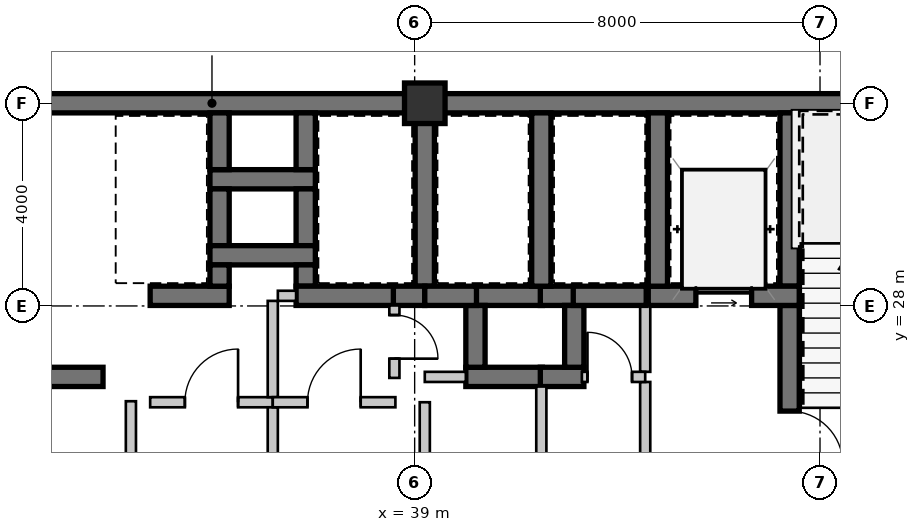
"""IFC4 building model, lengths in metres.
Left out: names, types, materials, properties, quantities, classifications, styles, units other than length and angle.
Written with IfcOpenShell. Run it as: python <this file> out.ifc"""

import sys

from ifc_helpers import new_model, si_unit, direction, frame, frame_2d, origin, origin_2d, place, context, subcontext, project, spatial, rectangle, extrude, source, transform, mapped, element, fill, save


model = new_model("IFC4")
c1 = context("Model", 3, precision=1e-05, world=origin(), true_north=direction((0.0, 1.0)))
c2 = subcontext(c1, "Body", "Model", "MODEL_VIEW")
j1 = project(units=[si_unit("LENGTHUNIT", "METRE"), si_unit("PLANEANGLEUNIT", "RADIAN")], contexts=[c1])
p1 = place(None, origin())
s1 = spatial("IfcSite", under=j1, at=p1, CompositionType="ELEMENT")
p2 = place(p1, origin())
s2 = spatial("IfcBuilding", under=s1, at=p2, CompositionType="ELEMENT")
p3 = place(p2, frame((0.0, 0.0, 45.15)))
s3 = spatial("IfcBuildingStorey", under=s2, at=p3, CompositionType="ELEMENT", Elevation=45.15)
m1 = source(origin(), c2, "Body", "SweptSolid", [
    extrude(rectangle(XDim=0.8, YDim=0.8, at=origin_2d()), origin(), (0.0, 0.0, 1.0), 3.15),
])
p4 = place(p3, frame((39.2, 32.0, 0.0), z_axis=(0.0, 0.0, 1.0), x_axis=(1.0, 0.0, 0.0)))
e1 = element("IfcColumn", 1, at=p4, inside=s3, PredefinedType="COLUMN", context=c2, shape_type="MappedRepresentation", body=[
    mapped(m1, transform((0.0, 0.0, 0.0), scale=1.0)),
])
m2 = source(origin(), c2, "Body", "SweptSolid", [
    extrude(rectangle(XDim=11.2, YDim=0.38, at=frame_2d((5.6, 0.0))), origin(), (0.0, 0.0, 1.0), 2.93),
])
p5 = place(p3, frame((28.0, 32.0, 0.0), z_axis=(0.0, 0.0, 1.0), x_axis=(1.0, 0.0, 0.0)))
e2 = element("IfcWall", 2, at=p5, inside=s3, PredefinedType="SHEAR", context=c2, shape_type="MappedRepresentation", body=[
    mapped(m2, transform((0.0, 0.0, 0.0), scale=1.0)),
])
m3 = source(origin(), c2, "Body", "SweptSolid", [
    extrude(rectangle(XDim=11.99, YDim=0.38, at=frame_2d((5.995, 0.0))), origin(), (0.0, 0.0, 1.0), 2.93),
])
p6 = place(p3, frame((39.2, 32.0, 0.0), z_axis=(0.0, 0.0, 1.0), x_axis=(1.0, 0.0, 0.0)))
e3 = element("IfcWall", 3, at=p6, inside=s3, PredefinedType="SHEAR", context=c2, shape_type="MappedRepresentation", body=[
    mapped(m3, transform((0.0, 0.0, 0.0), scale=1.0)),
])
m4 = source(origin(), c2, "Body", "SweptSolid", [
    extrude(rectangle(XDim=3.42, YDim=0.38, at=frame_2d((1.71, 0.0))), origin(), (0.0, 0.0, 1.0), 2.93),
])
p7 = place(p3, frame((46.4, 31.81, 0.0), z_axis=(0.0, 0.0, 1.0), x_axis=(0.0, -1.0, 0.0)))
e4 = element("IfcWall", 4, at=p7, inside=s3, PredefinedType="SHEAR", context=c2, shape_type="MappedRepresentation", body=[
    mapped(m4, transform((0.0, 0.0, 0.0), scale=1.0)),
])
m5 = source(origin(), c2, "Body", "SweptSolid", [
    extrude(rectangle(XDim=3.82, YDim=0.38, at=frame_2d((1.91, 0.0))), origin(), (0.0, 0.0, 1.0), 2.93),
])
p8 = place(p3, frame((46.4, 28.01, 0.0), z_axis=(0.0, 0.0, 1.0), x_axis=(0.0, -1.0, 0.0)))
e5 = element("IfcWall", 5, at=p8, inside=s3, PredefinedType="SHEAR", context=c2, shape_type="MappedRepresentation", body=[
    mapped(m5, transform((0.0, 0.0, 0.0), scale=1.0)),
])
m6 = source(origin(), c2, "Body", "SweptSolid", [
    extrude(rectangle(XDim=1.05, YDim=2.1, at=frame_2d((0.525, 1.05))), frame((0.0, 0.2, 0.0), z_axis=(0.0, -1.0, 0.0), x_axis=(1.0, 0.0, 0.0)), (0.0, 0.0, 1.0), 0.4),
])
p9 = place(p8, frame((2.085, 0.0, 0.0)))
e6 = element("IfcOpeningElement", 6, at=p9, cuts=e5, PredefinedType="OPENING", context=c2, shape_type="MappedRepresentation", body=[
    mapped(m6, transform((0.0, 0.0, 0.0), scale=1.0)),
])
m7 = source(origin(), c2, "Body", "SweptSolid", [
    extrude(rectangle(XDim=2.98, YDim=0.38, at=frame_2d((1.49, 0.0))), origin(), (0.0, 0.0, 1.0), 2.93),
])
p10 = place(p3, frame((43.61, 28.2, 0.0), z_axis=(0.0, 0.0, 1.0), x_axis=(1.0, 0.0, 0.0)))
e7 = element("IfcWall", 7, at=p10, inside=s3, PredefinedType="SHEAR", context=c2, shape_type="MappedRepresentation", body=[
    mapped(m7, transform((0.0, 0.0, 0.0), scale=1.0)),
])
m8 = source(origin(), c2, "Body", "SweptSolid", [
    extrude(rectangle(XDim=1.1, YDim=2.15, at=frame_2d((0.55, 1.075))), frame((0.0, 0.2, 0.0), z_axis=(0.0, -1.0, 0.0), x_axis=(1.0, 0.0, 0.0)), (0.0, 0.0, 1.0), 0.4),
])
p11 = place(p10, frame((0.94, 0.0, 0.0)))
e8 = element("IfcOpeningElement", 8, at=p11, cuts=e7, PredefinedType="OPENING", context=c2, shape_type="MappedRepresentation", body=[
    mapped(m8, transform((0.0, 0.0, 0.0), scale=1.0)),
])
p12 = place(p3, frame((43.8, 31.81, 0.0), z_axis=(0.0, 0.0, 1.0), x_axis=(0.0, -1.0, 0.0)))
e9 = element("IfcWall", 9, at=p12, inside=s3, PredefinedType="SHEAR", context=c2, shape_type="MappedRepresentation", body=[
    mapped(m4, transform((0.0, 0.0, 0.0), scale=1.0)),
])
m9 = source(origin(), c2, "Body", "SweptSolid", [
    extrude(rectangle(XDim=2.4, YDim=0.2, at=frame_2d((1.2, 0.0))), origin(), (0.0, 0.0, 1.0), 2.93),
])
p13 = place(p3, frame((43.55, 26.5, 0.0), z_axis=(0.0, 0.0, 1.0), x_axis=(0.0, -1.0, 0.0)))
e10 = element("IfcWall", 10, at=p13, inside=s3, PredefinedType="SOLIDWALL", context=c2, shape_type="MappedRepresentation", body=[
    mapped(m9, transform((0.0, 0.0, 0.0), scale=1.0)),
])
m10 = source(origin(), c2, "Body", "SweptSolid", [
    extrude(rectangle(XDim=1.31, YDim=0.2, at=frame_2d((0.655, 0.0))), origin(), (0.0, 0.0, 1.0), 2.93),
])
p14 = place(p3, frame((43.55, 28.01, 0.0), z_axis=(0.0, 0.0, 1.0), x_axis=(0.0, -1.0, 0.0)))
e11 = element("IfcWall", 11, at=p14, inside=s3, PredefinedType="SOLIDWALL", context=c2, shape_type="MappedRepresentation", body=[
    mapped(m10, transform((0.0, 0.0, 0.0), scale=1.0)),
])
m11 = source(origin(), c2, "Body", "SweptSolid", [
    extrude(rectangle(XDim=2.08, YDim=0.38, at=frame_2d((1.04, 0.0))), origin(), (0.0, 0.0, 1.0), 2.93),
])
p15 = place(p3, frame((34.96, 30.5, 0.0), z_axis=(0.0, 0.0, 1.0), x_axis=(1.0, 0.0, 0.0)))
e12 = element("IfcWall", 12, at=p15, inside=s3, PredefinedType="SHEAR", context=c2, shape_type="MappedRepresentation", body=[
    mapped(m11, transform((0.0, 0.0, 0.0), scale=1.0)),
])
m12 = source(origin(), c2, "Body", "SweptSolid", [
    extrude(rectangle(XDim=1.12, YDim=0.38, at=frame_2d((0.56, 0.0))), origin(), (0.0, 0.0, 1.0), 2.93),
])
for number, where, z_axis, x_axis in (
    (13, (35.15, 31.81, 0.0), (0.0, 0.0, 1.0), (0.0, -1.0, 0.0)),
    (14, (36.85, 30.69, 0.0), (0.0, 0.0, 1.0), (0.0, 1.0, 0.0)),
    (15, (35.15, 30.31, 0.0), (0.0, 0.0, 1.0), (0.0, -1.0, 0.0)),
    (16, (36.85, 29.19, 0.0), (0.0, 0.0, 1.0), (0.0, 1.0, 0.0)),
):
    element("IfcWall", number, at=place(p3, frame(where, z_axis=z_axis, x_axis=x_axis)), inside=s3, PredefinedType="SHEAR", context=c2, shape_type="MappedRepresentation", body=[
        mapped(m12, transform((0.0, 0.0, 0.0), scale=1.0)),
    ])
p16 = place(p3, frame((34.96, 29.0, 0.0), z_axis=(0.0, 0.0, 1.0), x_axis=(1.0, 0.0, 0.0)))
e17 = element("IfcWall", 17, at=p16, inside=s3, PredefinedType="SHEAR", context=c2, shape_type="MappedRepresentation", body=[
    mapped(m11, transform((0.0, 0.0, 0.0), scale=1.0)),
])
m13 = source(origin(), c2, "Body", "SweptSolid", [
    extrude(rectangle(XDim=2.24, YDim=0.38, at=frame_2d((1.12, 0.0))), origin(), (0.0, 0.0, 1.0), 2.93),
])
p17 = place(p3, frame((30.61, 26.6, 0.0), z_axis=(0.0, 0.0, 1.0), x_axis=(1.0, 0.0, 0.0)))
e18 = element("IfcWall", 18, at=p17, inside=s3, PredefinedType="SHEAR", context=c2, shape_type="MappedRepresentation", body=[
    mapped(m13, transform((0.0, 0.0, 0.0), scale=1.0)),
])
m14 = source(origin(), c2, "Body", "SweptSolid", [
    extrude(rectangle(XDim=1.32, YDim=0.38, at=frame_2d((0.66, 0.0))), origin(), (0.0, 0.0, 1.0), 2.93),
])
p18 = place(p3, frame((41.52, 28.2, 0.0), z_axis=(0.0, 0.0, 1.0), x_axis=(-1.0, 0.0, 0.0)))
e19 = element("IfcWall", 19, at=p18, inside=s3, PredefinedType="SHEAR", context=c2, shape_type="MappedRepresentation", body=[
    mapped(m14, transform((0.0, 0.0, 0.0), scale=1.0)),
])
m15 = source(origin(), c2, "Body", "SweptSolid", [
    extrude(rectangle(XDim=0.67, YDim=0.38, at=frame_2d((0.335, 0.0))), origin(), (0.0, 0.0, 1.0), 2.93),
])
p19 = place(p3, frame((42.15, 28.2, 0.0), z_axis=(0.0, 0.0, 1.0), x_axis=(-1.0, 0.0, 0.0)))
e20 = element("IfcWall", 20, at=p19, inside=s3, PredefinedType="SHEAR", context=c2, shape_type="MappedRepresentation", body=[
    mapped(m15, transform((0.0, 0.0, 0.0), scale=1.0)),
])
m16 = source(origin(), c2, "Body", "SweptSolid", [
    extrude(rectangle(XDim=1.51, YDim=0.38, at=frame_2d((0.755, 0.0))), origin(), (0.0, 0.0, 1.0), 2.93),
])
p20 = place(p3, frame((40.01, 26.6, 0.0), z_axis=(0.0, 0.0, 1.0), x_axis=(1.0, 0.0, 0.0)))
e21 = element("IfcWall", 21, at=p20, inside=s3, PredefinedType="SHEAR", context=c2, shape_type="MappedRepresentation", body=[
    mapped(m16, transform((0.0, 0.0, 0.0), scale=1.0)),
])
m17 = source(origin(), c2, "Body", "SweptSolid", [
    extrude(rectangle(XDim=1.22, YDim=0.38, at=frame_2d((0.61, 0.0))), origin(), (0.0, 0.0, 1.0), 2.93),
])
p21 = place(p3, frame((40.2, 28.01, 0.0), z_axis=(0.0, 0.0, 1.0), x_axis=(0.0, -1.0, 0.0)))
e22 = element("IfcWall", 22, at=p21, inside=s3, PredefinedType="SHEAR", context=c2, shape_type="MappedRepresentation", body=[
    mapped(m17, transform((0.0, 0.0, 0.0), scale=1.0)),
])
m18 = source(origin(), c2, "Body", "SweptSolid", [
    extrude(rectangle(XDim=0.86, YDim=0.38, at=frame_2d((0.43, 0.0))), origin(), (0.0, 0.0, 1.0), 2.93),
])
p22 = place(p3, frame((41.48, 26.6, 0.0), z_axis=(0.0, 0.0, 1.0), x_axis=(1.0, 0.0, 0.0)))
e23 = element("IfcWall", 23, at=p22, inside=s3, PredefinedType="SHEAR", context=c2, shape_type="MappedRepresentation", body=[
    mapped(m18, transform((0.0, 0.0, 0.0), scale=1.0)),
])
p23 = place(p3, frame((42.15, 26.79, 0.0), z_axis=(0.0, 0.0, 1.0), x_axis=(0.0, 1.0, 0.0)))
e24 = element("IfcWall", 24, at=p23, inside=s3, PredefinedType="SHEAR", context=c2, shape_type="MappedRepresentation", body=[
    mapped(m17, transform((0.0, 0.0, 0.0), scale=1.0)),
])
m19 = source(origin(), c2, "Body", "SweptSolid", [
    extrude(rectangle(XDim=1.56, YDim=0.38, at=frame_2d((0.78, 0.0))), origin(), (0.0, 0.0, 1.0), 2.93),
])
p24 = place(p3, frame((33.78, 28.2, 0.0), z_axis=(0.0, 0.0, 1.0), x_axis=(1.0, 0.0, 0.0)))
e25 = element("IfcWall", 25, at=p24, inside=s3, PredefinedType="SHEAR", context=c2, shape_type="MappedRepresentation", body=[
    mapped(m19, transform((0.0, 0.0, 0.0), scale=1.0)),
])
m20 = source(origin(), c2, "Body", "SweptSolid", [
    extrude(rectangle(XDim=0.42, YDim=0.38, at=frame_2d((0.21, 0.0))), origin(), (0.0, 0.0, 1.0), 2.93),
])
p25 = place(p3, frame((35.15, 28.39, 0.0), z_axis=(0.0, 0.0, 1.0), x_axis=(0.0, 1.0, 0.0)))
e26 = element("IfcWall", 26, at=p25, inside=s3, PredefinedType="SHEAR", context=c2, shape_type="MappedRepresentation", body=[
    mapped(m20, transform((0.0, 0.0, 0.0), scale=1.0)),
])
p26 = place(p3, frame((39.2, 28.39, 0.0), z_axis=(0.0, 0.0, 1.0), x_axis=(0.0, 1.0, 0.0)))
e27 = element("IfcWall", 27, at=p26, inside=s3, PredefinedType="SHEAR", context=c2, shape_type="MappedRepresentation", body=[
    mapped(m4, transform((0.0, 0.0, 0.0), scale=1.0)),
])
p27 = place(p3, frame((36.85, 28.81, 0.0), z_axis=(0.0, 0.0, 1.0), x_axis=(0.0, -1.0, 0.0)))
e28 = element("IfcWall", 28, at=p27, inside=s3, PredefinedType="SHEAR", context=c2, shape_type="MappedRepresentation", body=[
    mapped(m20, transform((0.0, 0.0, 0.0), scale=1.0)),
])
m21 = source(origin(), c2, "Body", "SweptSolid", [
    extrude(rectangle(XDim=1.96, YDim=0.38, at=frame_2d((0.98, 0.0))), origin(), (0.0, 0.0, 1.0), 2.93),
])
p28 = place(p3, frame((36.66, 28.2, 0.0), z_axis=(0.0, 0.0, 1.0), x_axis=(1.0, 0.0, 0.0)))
e29 = element("IfcWall", 29, at=p28, inside=s3, PredefinedType="SHEAR", context=c2, shape_type="MappedRepresentation", body=[
    mapped(m21, transform((0.0, 0.0, 0.0), scale=1.0)),
])
m22 = source(origin(), c2, "Body", "SweptSolid", [
    extrude(rectangle(XDim=0.62, YDim=0.38, at=frame_2d((0.31, 0.0))), origin(), (0.0, 0.0, 1.0), 2.93),
])
p29 = place(p3, frame((38.58, 28.2, 0.0), z_axis=(0.0, 0.0, 1.0), x_axis=(1.0, 0.0, 0.0)))
e30 = element("IfcWall", 30, at=p29, inside=s3, PredefinedType="SHEAR", context=c2, shape_type="MappedRepresentation", body=[
    mapped(m22, transform((0.0, 0.0, 0.0), scale=1.0)),
])
p30 = place(p3, frame((41.5, 28.39, 0.0), z_axis=(0.0, 0.0, 1.0), x_axis=(0.0, 1.0, 0.0)))
e31 = element("IfcWall", 31, at=p30, inside=s3, PredefinedType="SHEAR", context=c2, shape_type="MappedRepresentation", body=[
    mapped(m4, transform((0.0, 0.0, 0.0), scale=1.0)),
])
m23 = source(origin(), c2, "Body", "SweptSolid", [
    extrude(rectangle(XDim=1.02, YDim=0.38, at=frame_2d((0.51, 0.0))), origin(), (0.0, 0.0, 1.0), 2.93),
])
p31 = place(p3, frame((39.2, 28.2, 0.0), z_axis=(0.0, 0.0, 1.0), x_axis=(1.0, 0.0, 0.0)))
e32 = element("IfcWall", 32, at=p31, inside=s3, PredefinedType="SHEAR", context=c2, shape_type="MappedRepresentation", body=[
    mapped(m23, transform((0.0, 0.0, 0.0), scale=1.0)),
])
m24 = source(origin(), c2, "Body", "SweptSolid", [
    extrude(rectangle(XDim=1.44, YDim=0.38, at=frame_2d((0.72, 0.0))), origin(), (0.0, 0.0, 1.0), 2.93),
])
p32 = place(p3, frame((42.13, 28.2, 0.0), z_axis=(0.0, 0.0, 1.0), x_axis=(1.0, 0.0, 0.0)))
e33 = element("IfcWall", 33, at=p32, inside=s3, PredefinedType="SHEAR", context=c2, shape_type="MappedRepresentation", body=[
    mapped(m24, transform((0.0, 0.0, 0.0), scale=1.0)),
])
m25 = source(origin(), c2, "Body", "SweptSolid", [
    extrude(rectangle(XDim=2.02, YDim=0.2, at=frame_2d((1.01, 0.0))), origin(), (0.0, 0.0, 1.0), 2.93),
])
p33 = place(p3, frame((33.4, 26.12, 0.0), z_axis=(0.0, 0.0, 1.0), x_axis=(0.0, -1.0, 0.0)))
e34 = element("IfcWall", 34, at=p33, inside=s3, PredefinedType="SOLIDWALL", context=c2, shape_type="MappedRepresentation", body=[
    mapped(m25, transform((0.0, 0.0, 0.0), scale=1.0)),
])
m26 = source(origin(), c2, "Body", "SweptSolid", [
    extrude(rectangle(XDim=2.42, YDim=0.2, at=frame_2d((1.21, 0.0))), origin(), (0.0, 0.0, 1.0), 2.93),
])
p34 = place(p3, frame((33.78, 26.1, 0.0), z_axis=(0.0, 0.0, 1.0), x_axis=(1.0, 0.0, 0.0)))
e35 = element("IfcWall", 35, at=p34, inside=s3, PredefinedType="SOLIDWALL", context=c2, shape_type="MappedRepresentation", body=[
    mapped(m26, transform((0.0, 0.0, 0.0), scale=1.0)),
])
m27 = source(origin(), c2, "Body", "SweptSolid", [
    extrude(rectangle(XDim=1.05, YDim=2.1, at=frame_2d((0.525, 1.05))), frame((0.0, 0.11, 0.0), z_axis=(0.0, -1.0, 0.0), x_axis=(1.0, 0.0, 0.0)), (0.0, 0.0, 1.0), 0.22),
])
p35 = place(p34, frame((0.685, 0.0, 0.0)))
e36 = element("IfcOpeningElement", 36, at=p35, cuts=e35, PredefinedType="OPENING", context=c2, shape_type="MappedRepresentation", body=[
    mapped(m27, transform((0.0, 0.0, 0.0), scale=1.0)),
])
m28 = source(origin(), c2, "Body", "SweptSolid", [
    extrude(rectangle(XDim=1.9, YDim=0.2, at=frame_2d((0.95, 0.0))), origin(), (0.0, 0.0, 1.0), 2.93),
])
p36 = place(p3, frame((36.2, 26.0, 0.0), z_axis=(0.0, 0.0, 1.0), x_axis=(0.0, -1.0, 0.0)))
e37 = element("IfcWall", 37, at=p36, inside=s3, PredefinedType="SOLIDWALL", context=c2, shape_type="MappedRepresentation", body=[
    mapped(m28, transform((0.0, 0.0, 0.0), scale=1.0)),
])
m29 = source(origin(), c2, "Body", "SweptSolid", [
    extrude(rectangle(XDim=1.9, YDim=0.2, at=frame_2d((0.95, 0.0))), origin(), (0.0, 0.0, 1.0), 2.93),
])
p37 = place(p3, frame((36.2, 28.1, 0.0), z_axis=(0.0, 0.0, 1.0), x_axis=(0.0, -1.0, 0.0)))
e38 = element("IfcWall", 38, at=p37, inside=s3, PredefinedType="SOLIDWALL", context=c2, shape_type="MappedRepresentation", body=[
    mapped(m29, transform((0.0, 0.0, 0.0), scale=1.0)),
])
m30 = source(origin(), c2, "Body", "SweptSolid", [
    extrude(rectangle(XDim=0.36, YDim=0.2, at=frame_2d((0.18, 0.0))), origin(), (0.0, 0.0, 1.0), 2.93),
])
p38 = place(p3, frame((36.66, 28.2, 0.0), z_axis=(0.0, 0.0, 1.0), x_axis=(-1.0, 0.0, 0.0)))
e39 = element("IfcWall", 39, at=p38, inside=s3, PredefinedType="SOLIDWALL", context=c2, shape_type="MappedRepresentation", body=[
    mapped(m30, transform((0.0, 0.0, 0.0), scale=1.0)),
])
m31 = source(origin(), c2, "Body", "SweptSolid", [
    extrude(rectangle(XDim=2.42, YDim=0.2, at=frame_2d((1.21, 0.0))), origin(), (0.0, 0.0, 1.0), 2.93),
])
p39 = place(p3, frame((36.2, 26.1, 0.0), z_axis=(0.0, 0.0, 1.0), x_axis=(1.0, 0.0, 0.0)))
e40 = element("IfcWall", 40, at=p39, inside=s3, PredefinedType="SOLIDWALL", context=c2, shape_type="MappedRepresentation", body=[
    mapped(m31, transform((0.0, 0.0, 0.0), scale=1.0)),
])
p40 = place(p39, frame((0.685, 0.0, 0.0)))
e41 = element("IfcOpeningElement", 41, at=p40, cuts=e40, PredefinedType="OPENING", context=c2, shape_type="MappedRepresentation", body=[
    mapped(m27, transform((0.0, 0.0, 0.0), scale=1.0)),
])
m32 = source(origin(), c2, "Body", "SweptSolid", [
    extrude(rectangle(XDim=2.0, YDim=0.2, at=frame_2d((1.0, 0.0))), origin(), (0.0, 0.0, 1.0), 2.47),
])
p41 = place(p3, frame((39.2, 26.1, 0.0), z_axis=(0.0, 0.0, 1.0), x_axis=(0.0, -1.0, 0.0)))
e42 = element("IfcWall", 42, at=p41, inside=s3, PredefinedType="SOLIDWALL", context=c2, shape_type="MappedRepresentation", body=[
    mapped(m32, transform((0.0, 0.0, 0.0), scale=1.0)),
])
m33 = source(origin(), c2, "Body", "SweptSolid", [
    extrude(rectangle(XDim=1.43, YDim=0.2, at=frame_2d((0.715, 0.0))), origin(), (0.0, 0.0, 1.0), 2.93),
])
p42 = place(p3, frame((38.6, 28.01, 0.0), z_axis=(0.0, 0.0, 1.0), x_axis=(0.0, -1.0, 0.0)))
e43 = element("IfcWall", 43, at=p42, inside=s3, PredefinedType="SOLIDWALL", context=c2, shape_type="MappedRepresentation", body=[
    mapped(m33, transform((0.0, 0.0, 0.0), scale=1.0)),
])
m34 = source(origin(), c2, "Body", "SweptSolid", [
    extrude(rectangle(XDim=0.86, YDim=2.1, at=frame_2d((0.43, 1.05))), frame((0.0, 0.11, 0.0), z_axis=(0.0, -1.0, 0.0), x_axis=(1.0, 0.0, 0.0)), (0.0, 0.0, 1.0), 0.22),
])
p43 = place(p42, frame((0.19, 0.0, 0.0)))
e44 = element("IfcOpeningElement", 44, at=p43, cuts=e43, PredefinedType="OPENING", context=c2, shape_type="MappedRepresentation", body=[
    mapped(m34, transform((0.0, 0.0, 0.0), scale=1.0)),
])
m35 = source(origin(), c2, "Body", "SweptSolid", [
    extrude(rectangle(XDim=0.81, YDim=0.2, at=frame_2d((0.405, 0.0))), origin(), (0.0, 0.0, 1.0), 2.93),
])
p44 = place(p3, frame((39.2, 26.6, 0.0), z_axis=(0.0, 0.0, 1.0), x_axis=(1.0, 0.0, 0.0)))
e45 = element("IfcWall", 45, at=p44, inside=s3, PredefinedType="SOLIDWALL", context=c2, shape_type="MappedRepresentation", body=[
    mapped(m35, transform((0.0, 0.0, 0.0), scale=1.0)),
])
m36 = source(origin(), c2, "Body", "SweptSolid", [
    extrude(rectangle(XDim=2.31, YDim=0.2, at=frame_2d((1.155, 0.0))), origin(), (0.0, 0.0, 1.0), 2.93),
])
p45 = place(p3, frame((41.5, 26.41, 0.0), z_axis=(0.0, 0.0, 1.0), x_axis=(0.0, -1.0, 0.0)))
e46 = element("IfcWall", 46, at=p45, inside=s3, PredefinedType="SOLIDWALL", context=c2, shape_type="MappedRepresentation", body=[
    mapped(m36, transform((0.0, 0.0, 0.0), scale=1.0)),
])
m37 = source(origin(), c2, "Body", "SweptSolid", [
    extrude(rectangle(XDim=1.25, YDim=0.2, at=frame_2d((0.625, 0.0))), origin(), (0.0, 0.0, 1.0), 2.93),
])
p46 = place(p3, frame((42.3, 26.6, 0.0), z_axis=(0.0, 0.0, 1.0), x_axis=(1.0, 0.0, 0.0)))
e47 = element("IfcWall", 47, at=p46, inside=s3, PredefinedType="SOLIDWALL", context=c2, shape_type="MappedRepresentation", body=[
    mapped(m37, transform((0.0, 0.0, 0.0), scale=1.0)),
])
m38 = source(origin(), c2, "Body", "SweptSolid", [
    extrude(rectangle(XDim=0.88, YDim=2.1, at=frame_2d((0.44, 1.05))), frame((0.0, 0.11, 0.0), z_axis=(0.0, -1.0, 0.0), x_axis=(1.0, 0.0, 0.0)), (0.0, 0.0, 1.0), 0.22),
])
p47 = place(p46, frame((0.11, 0.0, 0.0)))
e48 = element("IfcOpeningElement", 48, at=p47, cuts=e47, PredefinedType="OPENING", context=c2, shape_type="MappedRepresentation", body=[
    mapped(m38, transform((0.0, 0.0, 0.0), scale=1.0)),
])
m39 = source(origin(), c2, "Body", "SweptSolid", [
    extrude(rectangle(XDim=1.05, YDim=2.1, at=frame_2d((0.525, 1.05))), frame((0.0, 0.025, 0.0), z_axis=(0.0, -1.0, 0.0), x_axis=(1.0, 0.0, 0.0)), (0.0, 0.0, 1.0), 0.05),
])
p48 = place(p9, origin())
e49 = element("IfcDoor", 49, at=p48, inside=s3, OperationType="SINGLE_SWING_RIGHT", PredefinedType="DOOR", context=c2, shape_type="MappedRepresentation", body=[
    mapped(m39, transform((0.0, 0.0, 0.0), scale=1.0)),
])
fill(e6, e49)
m40 = source(origin(), c2, "Body", "SweptSolid", [
    extrude(rectangle(XDim=1.1, YDim=2.15, at=frame_2d((0.55, 1.075))), frame((0.0, 0.025, 0.0), z_axis=(0.0, -1.0, 0.0), x_axis=(1.0, 0.0, 0.0)), (0.0, 0.0, 1.0), 0.05),
])
p49 = place(p11, origin())
e50 = element("IfcDoor", 50, at=p49, inside=s3, OperationType="SLIDING_TO_LEFT", PredefinedType="DOOR", context=c2, shape_type="MappedRepresentation", body=[
    mapped(m40, transform((0.0, 0.0, 0.0), scale=1.0)),
])
fill(e8, e50)
p50 = place(p35, origin())
e51 = element("IfcDoor", 51, at=p50, inside=s3, OperationType="SINGLE_SWING_RIGHT", PredefinedType="DOOR", context=c2, shape_type="MappedRepresentation", body=[
    mapped(m39, transform((0.0, 0.0, 0.0), scale=1.0)),
])
fill(e36, e51)
p51 = place(p40, origin())
e52 = element("IfcDoor", 52, at=p51, inside=s3, OperationType="SINGLE_SWING_RIGHT", PredefinedType="DOOR", context=c2, shape_type="MappedRepresentation", body=[
    mapped(m39, transform((0.0, 0.0, 0.0), scale=1.0)),
])
fill(e41, e52)
m41 = source(origin(), c2, "Body", "SweptSolid", [
    extrude(rectangle(XDim=0.88, YDim=2.1, at=frame_2d((0.44, 1.05))), frame((0.0, 0.025, 0.0), z_axis=(0.0, -1.0, 0.0), x_axis=(1.0, 0.0, 0.0)), (0.0, 0.0, 1.0), 0.05),
])
p52 = place(p47, origin())
e53 = element("IfcDoor", 53, at=p52, inside=s3, OperationType="SINGLE_SWING_LEFT", PredefinedType="DOOR", context=c2, shape_type="MappedRepresentation", body=[
    mapped(m41, transform((0.0, 0.0, 0.0), scale=1.0)),
])
fill(e48, e53)
m42 = source(origin(), c2, "Body", "SweptSolid", [
    extrude(rectangle(XDim=0.86, YDim=2.1, at=frame_2d((0.43, 1.05))), frame((0.0, 0.025, 0.0), z_axis=(0.0, -1.0, 0.0), x_axis=(1.0, 0.0, 0.0)), (0.0, 0.0, 1.0), 0.05),
])
p53 = place(p43, origin())
e54 = element("IfcDoor", 54, at=p53, inside=s3, OperationType="SINGLE_SWING_RIGHT", PredefinedType="DOOR", context=c2, shape_type="MappedRepresentation", body=[
    mapped(m42, transform((0.0, 0.0, 0.0), scale=1.0)),
])
fill(e44, e54)
save(model, sys.argv[1])
